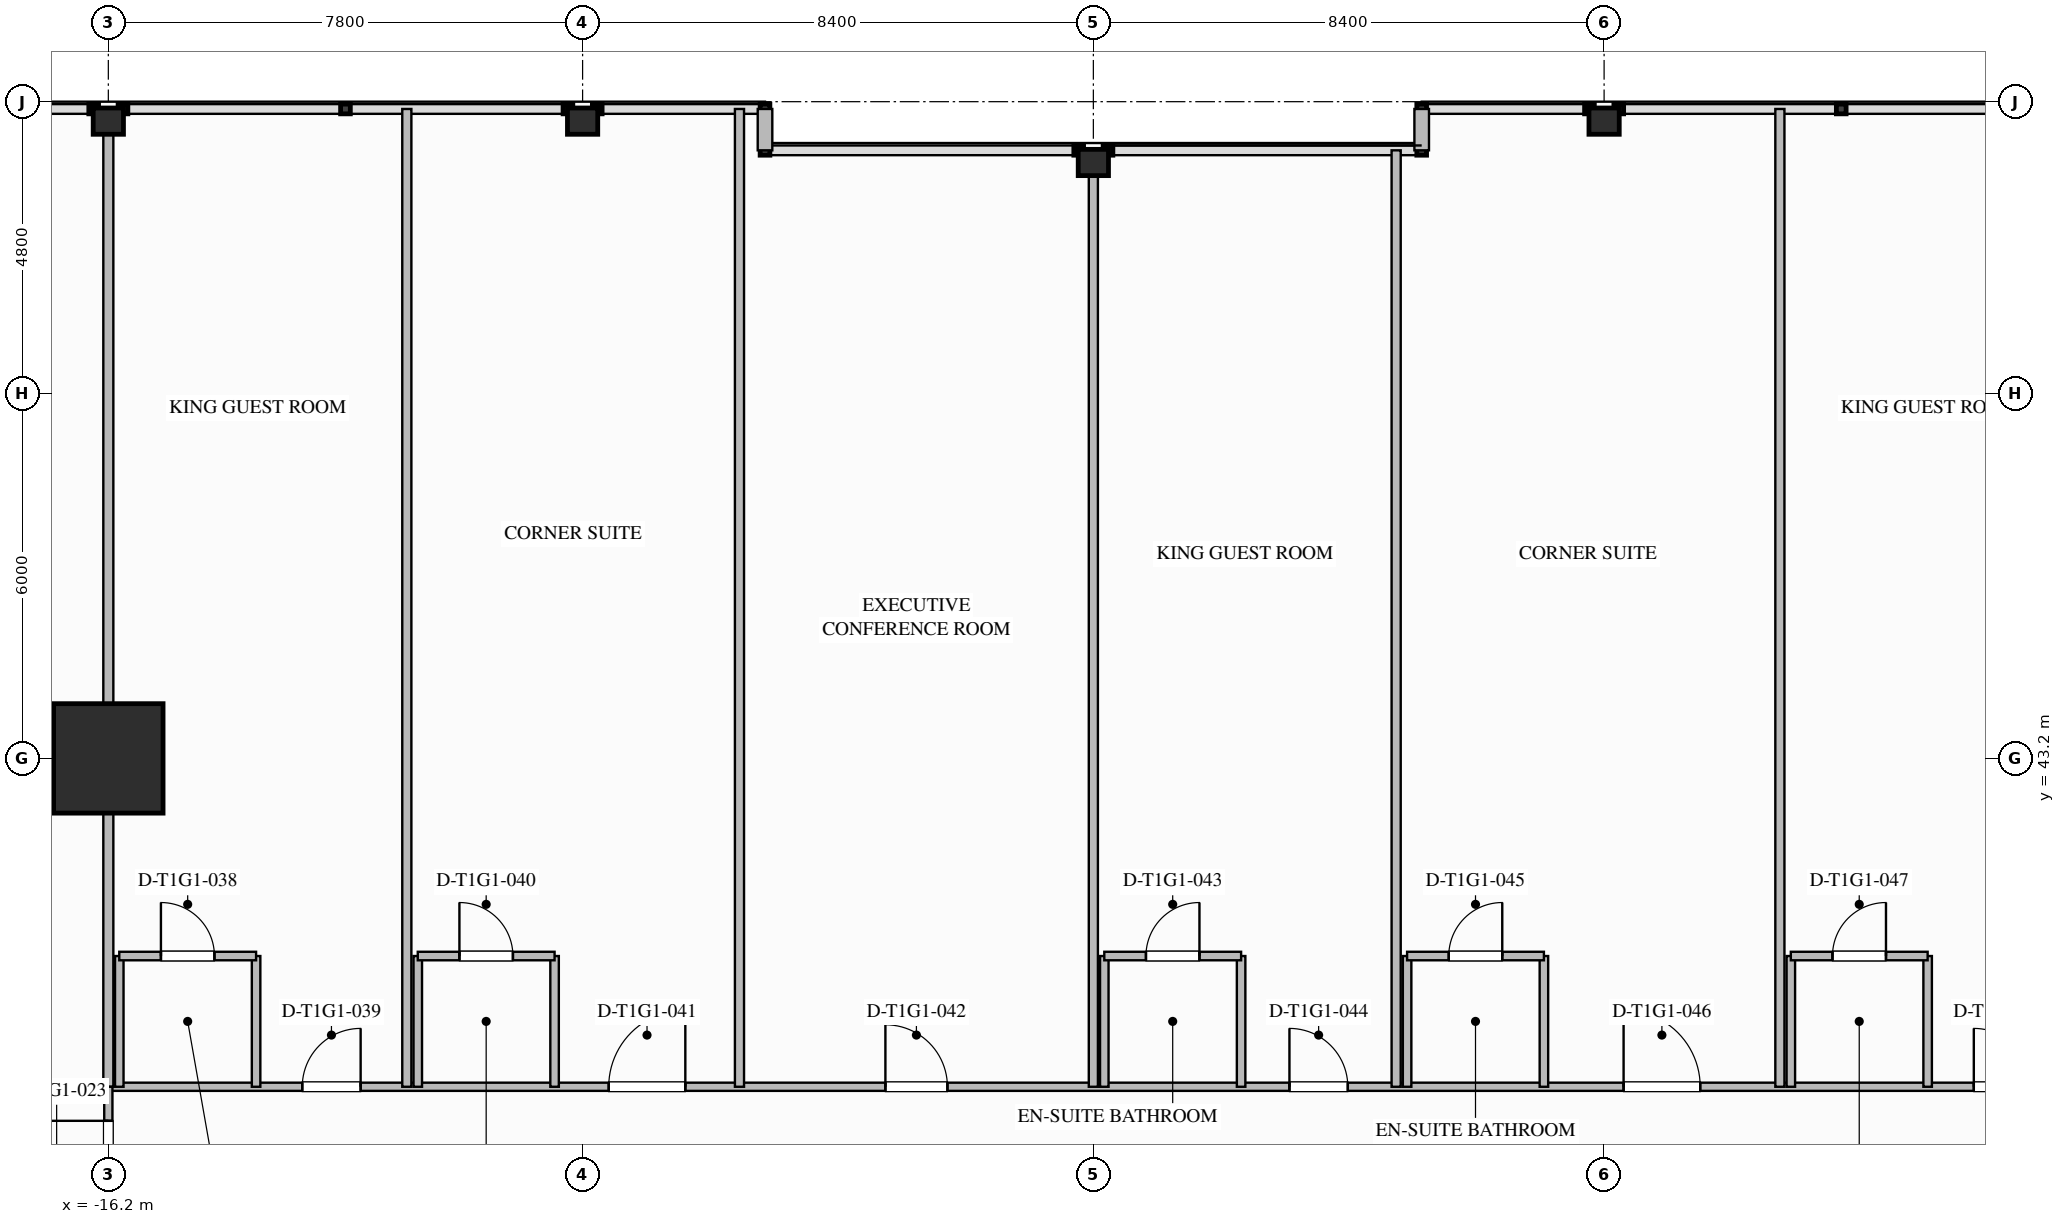
"""IFC4 building model, lengths in metres.
Left out: names, types, materials, properties, quantities, classifications, styles, units other than length and angle.
Written with IfcOpenShell. Run it as: python <this file> out.ifc"""

import sys

from ifc_helpers import new_model, si_unit, direction, frame, frame_2d, origin, origin_2d, place, context, subcontext, project, spatial, rectangle, i_section, extrude, element, fill, save


model = new_model("IFC4")
c1 = context("Model", 3, precision=1e-05, world=origin(), true_north=direction((0.0, 1.0)))
c2 = subcontext(c1, "Body", "Model", "MODEL_VIEW")
j1 = project(units=[si_unit("LENGTHUNIT", "METRE"), si_unit("PLANEANGLEUNIT", "RADIAN")], contexts=[c1])
p1 = place(None, origin())
s1 = spatial("IfcSite", under=j1, at=p1, CompositionType="ELEMENT")
p2 = place(p1, origin())
s2 = spatial("IfcBuilding", under=s1, at=p2, CompositionType="ELEMENT")
p3 = place(p2, frame((0.0, 0.0, 36.7)))
s3 = spatial("IfcBuildingStorey", under=s2, at=p3, CompositionType="ELEMENT", Elevation=36.7)
p4 = place(p3, frame((-16.2, 43.2, 0.0), z_axis=(0.0, 0.0, 1.0), x_axis=(1.0, 0.0, 0.0)))
e1 = element("IfcColumn", 1, at=p4, inside=s3, PredefinedType="COLUMN", context=c2, shape_type="SweptSolid", body=[
    extrude(rectangle(XDim=1.8, YDim=1.8, at=origin_2d()), origin(), (0.0, 0.0, 1.0), 3.5),
])
for number, where, z_axis, x_axis in (
    (2, (-16.2, 53.68, 0.0), (0.0, 0.0, 1.0), (0.0, 1.0, 0.0)),
    (3, (-8.4, 53.68, 0.0), (0.0, 0.0, 1.0), (0.0, 1.0, 0.0)),
    (4, (0.0, 53.0, 0.0), (0.0, 0.0, 1.0), (0.0, 1.0, 0.0)),
    (5, (8.4, 53.68, 0.0), (0.0, 0.0, 1.0), (0.0, 1.0, 0.0)),
):
    element("IfcColumn", number, at=place(p3, frame(where, z_axis=z_axis, x_axis=x_axis)), inside=s3, PredefinedType="COLUMN", context=c2, shape_type="SweptSolid", body=[
        extrude(i_section(OverallWidth=0.432, OverallDepth=0.498, WebThickness=0.056, FlangeThickness=0.089, FilletRadius=0.03, at=origin_2d()), origin(), (0.0, 0.0, 1.0), 3.497),
    ])
for number, where, z_axis, x_axis in (
    (6, (-5.4, 53.88, 0.0), (0.0, 0.0, 1.0), (0.0, -1.0, 0.0)),
    (7, (5.4, 53.2, 0.0), (0.0, 0.0, 1.0), (0.0, 1.0, 0.0)),
):
    element("IfcWall", number, at=place(p3, frame(where, z_axis=z_axis, x_axis=x_axis)), inside=s3, PredefinedType="STANDARD", context=c2, shape_type="SweptSolid", body=[
        extrude(rectangle(XDim=0.68, YDim=0.24, at=frame_2d((0.34, 0.0))), origin(), (0.0, 0.0, 1.0), 3.24),
    ])
p5 = place(p3, frame((-16.2, 37.8, 0.0), z_axis=(0.0, 0.0, 1.0), x_axis=(1.0, 0.0, 0.0)))
e8 = element("IfcWall", 8, at=p5, inside=s3, PredefinedType="PARTITIONING", context=c2, shape_type="SweptSolid", body=[
    extrude(rectangle(XDim=32.4, YDim=0.135, at=frame_2d((16.2, 0.0))), origin(), (0.0, 0.0, 1.0), 3.24),
])
p6 = place(p5, frame((3.189, 0.0, 0.0)))
e9 = element("IfcOpeningElement", 9, at=p6, cuts=e8, PredefinedType="OPENING", context=c2, shape_type="SweptSolid", body=[
    extrude(rectangle(XDim=0.96, YDim=2.15, at=frame_2d((0.48, 1.075))), frame((0.0, 0.077, 0.0), z_axis=(0.0, -1.0, 0.0), x_axis=(1.0, 0.0, 0.0)), (0.0, 0.0, 1.0), 0.155),
])
p7 = place(p5, frame((8.229, 0.0, 0.0)))
e10 = element("IfcOpeningElement", 10, at=p7, cuts=e8, PredefinedType="OPENING", context=c2, shape_type="SweptSolid", body=[
    extrude(rectangle(XDim=1.26, YDim=2.2, at=frame_2d((0.63, 1.1))), frame((0.0, 0.077, 0.0), z_axis=(0.0, -1.0, 0.0), x_axis=(1.0, 0.0, 0.0)), (0.0, 0.0, 1.0), 0.155),
])
p8 = place(p5, frame((12.78, 0.0, 0.0)))
e11 = element("IfcOpeningElement", 11, at=p8, cuts=e8, PredefinedType="OPENING", context=c2, shape_type="SweptSolid", body=[
    extrude(rectangle(XDim=1.02, YDim=2.15, at=frame_2d((0.51, 1.075))), frame((0.0, 0.077, 0.0), z_axis=(0.0, -1.0, 0.0), x_axis=(1.0, 0.0, 0.0)), (0.0, 0.0, 1.0), 0.155),
])
p9 = place(p5, frame((19.425, 0.0, 0.0)))
e12 = element("IfcOpeningElement", 12, at=p9, cuts=e8, PredefinedType="OPENING", context=c2, shape_type="SweptSolid", body=[
    extrude(rectangle(XDim=0.96, YDim=2.15, at=frame_2d((0.48, 1.075))), frame((0.0, 0.077, 0.0), z_axis=(0.0, -1.0, 0.0), x_axis=(1.0, 0.0, 0.0)), (0.0, 0.0, 1.0), 0.155),
])
p10 = place(p5, frame((24.92, 0.0, 0.0)))
e13 = element("IfcOpeningElement", 13, at=p10, cuts=e8, PredefinedType="OPENING", context=c2, shape_type="SweptSolid", body=[
    extrude(rectangle(XDim=1.26, YDim=2.2, at=frame_2d((0.63, 1.1))), frame((0.0, 0.077, 0.0), z_axis=(0.0, -1.0, 0.0), x_axis=(1.0, 0.0, 0.0)), (0.0, 0.0, 1.0), 0.155),
])
p11 = place(p5, frame((30.68, 0.0, 0.0)))
e14 = element("IfcOpeningElement", 14, at=p11, cuts=e8, PredefinedType="OPENING", context=c2, shape_type="SweptSolid", body=[
    extrude(rectangle(XDim=0.96, YDim=2.15, at=frame_2d((0.48, 1.075))), frame((0.0, 0.077, 0.0), z_axis=(0.0, -1.0, 0.0), x_axis=(1.0, 0.0, 0.0)), (0.0, 0.0, 1.0), 0.155),
])
p12 = place(p3, frame((-16.2, 37.8, 0.0), z_axis=(0.0, 0.0, 1.0), x_axis=(0.0, 1.0, 0.0)))
e15 = element("IfcWall", 15, at=p12, inside=s3, PredefinedType="PARTITIONING", context=c2, shape_type="SweptSolid", body=[
    extrude(rectangle(XDim=16.08, YDim=0.165, at=frame_2d((8.04, 0.0))), origin(), (0.0, 0.0, 1.0), 2.298),
])
p13 = place(p3, frame((-16.2, 35.7, 0.0), z_axis=(0.0, 0.0, 1.0), x_axis=(0.0, 1.0, 0.0)))
e16 = element("IfcWall", 16, at=p13, inside=s3, PredefinedType="PARTITIONING", context=c2, shape_type="SweptSolid", body=[
    extrude(rectangle(XDim=2.1, YDim=0.135, at=frame_2d((1.05, 0.0))), origin(), (0.0, 0.0, 1.0), 2.298),
])
p14 = place(p13, frame((0.52, 0.0, 0.0)))
e17 = element("IfcOpeningElement", 17, at=p14, cuts=e16, PredefinedType="OPENING", context=c2, shape_type="SweptSolid", body=[
    extrude(rectangle(XDim=1.02, YDim=2.15, at=frame_2d((0.51, 1.075))), frame((0.0, 0.077, 0.0), z_axis=(0.0, -1.0, 0.0), x_axis=(1.0, 0.0, 0.0)), (0.0, 0.0, 1.0), 0.155),
])
p15 = place(p3, frame((-16.02, 37.8, 0.0), z_axis=(0.0, 0.0, 1.0), x_axis=(0.0, 1.0, 0.0)))
e18 = element("IfcWall", 18, at=p15, inside=s3, PredefinedType="PLUMBINGWALL", context=c2, shape_type="SweptSolid", body=[
    extrude(rectangle(XDim=2.15, YDim=0.14, at=frame_2d((1.075, 0.0))), origin(), (0.0, 0.0, 1.0), 2.298),
])
p16 = place(p3, frame((-13.77, 37.8, 0.0), z_axis=(0.0, 0.0, 1.0), x_axis=(0.0, 1.0, 0.0)))
e19 = element("IfcWall", 19, at=p16, inside=s3, PredefinedType="PLUMBINGWALL", context=c2, shape_type="SweptSolid", body=[
    extrude(rectangle(XDim=2.15, YDim=0.14, at=frame_2d((1.075, 0.0))), origin(), (0.0, 0.0, 1.0), 3.24),
])
p17 = place(p3, frame((-16.02, 39.95, 0.0), z_axis=(0.0, 0.0, 1.0), x_axis=(1.0, 0.0, 0.0)))
e20 = element("IfcWall", 20, at=p17, inside=s3, PredefinedType="PLUMBINGWALL", context=c2, shape_type="SweptSolid", body=[
    extrude(rectangle(XDim=2.25, YDim=0.14, at=frame_2d((1.125, 0.0))), origin(), (0.0, 0.0, 1.0), 3.24),
])
p18 = place(p17, frame((0.685, 0.0, 0.0)))
e21 = element("IfcOpeningElement", 21, at=p18, cuts=e20, PredefinedType="OPENING", context=c2, shape_type="SweptSolid", body=[
    extrude(rectangle(XDim=0.88, YDim=2.1, at=frame_2d((0.44, 1.05))), frame((0.0, 0.08, 0.0), z_axis=(0.0, -1.0, 0.0), x_axis=(1.0, 0.0, 0.0)), (0.0, 0.0, 1.0), 0.16),
])
p19 = place(p3, frame((-11.291, 37.8, 0.0), z_axis=(0.0, 0.0, 1.0), x_axis=(0.0, 1.0, 0.0)))
e22 = element("IfcWall", 22, at=p19, inside=s3, PredefinedType="PARTITIONING", context=c2, shape_type="SweptSolid", body=[
    extrude(rectangle(XDim=16.08, YDim=0.15, at=frame_2d((8.04, 0.0))), origin(), (0.0, 0.0, 1.0), 3.24),
])
for number, where, z_axis, x_axis in (
    (23, (-11.111, 37.8, 0.0), (0.0, 0.0, 1.0), (0.0, 1.0, 0.0)),
    (24, (-8.861, 37.8, 0.0), (0.0, 0.0, 1.0), (0.0, 1.0, 0.0)),
):
    element("IfcWall", number, at=place(p3, frame(where, z_axis=z_axis, x_axis=x_axis)), inside=s3, PredefinedType="PLUMBINGWALL", context=c2, shape_type="SweptSolid", body=[
        extrude(rectangle(XDim=2.15, YDim=0.14, at=frame_2d((1.075, 0.0))), origin(), (0.0, 0.0, 1.0), 3.24),
    ])
p20 = place(p3, frame((-11.111, 39.95, 0.0), z_axis=(0.0, 0.0, 1.0), x_axis=(1.0, 0.0, 0.0)))
e25 = element("IfcWall", 25, at=p20, inside=s3, PredefinedType="PLUMBINGWALL", context=c2, shape_type="SweptSolid", body=[
    extrude(rectangle(XDim=2.25, YDim=0.14, at=frame_2d((1.125, 0.0))), origin(), (0.0, 0.0, 1.0), 3.24),
])
p21 = place(p20, frame((0.685, 0.0, 0.0)))
e26 = element("IfcOpeningElement", 26, at=p21, cuts=e25, PredefinedType="OPENING", context=c2, shape_type="SweptSolid", body=[
    extrude(rectangle(XDim=0.88, YDim=2.1, at=frame_2d((0.44, 1.05))), frame((0.0, 0.08, 0.0), z_axis=(0.0, -1.0, 0.0), x_axis=(1.0, 0.0, 0.0)), (0.0, 0.0, 1.0), 0.16),
])
p22 = place(p3, frame((-5.82, 37.8, 0.0), z_axis=(0.0, 0.0, 1.0), x_axis=(0.0, 1.0, 0.0)))
e27 = element("IfcWall", 27, at=p22, inside=s3, PredefinedType="PARTITIONING", context=c2, shape_type="SweptSolid", body=[
    extrude(rectangle(XDim=16.08, YDim=0.15, at=frame_2d((8.04, 0.0))), origin(), (0.0, 0.0, 1.0), 3.24),
])
p23 = place(p3, frame((0.0, 37.8, 0.0), z_axis=(0.0, 0.0, 1.0), x_axis=(0.0, 1.0, 0.0)))
e28 = element("IfcWall", 28, at=p23, inside=s3, PredefinedType="PARTITIONING", context=c2, shape_type="SweptSolid", body=[
    extrude(rectangle(XDim=15.4, YDim=0.15, at=frame_2d((7.7, 0.0))), origin(), (0.0, 0.0, 1.0), 2.298),
])
p24 = place(p3, frame((0.18, 37.8, 0.0), z_axis=(0.0, 0.0, 1.0), x_axis=(0.0, 1.0, 0.0)))
e29 = element("IfcWall", 29, at=p24, inside=s3, PredefinedType="PLUMBINGWALL", context=c2, shape_type="SweptSolid", body=[
    extrude(rectangle(XDim=2.15, YDim=0.14, at=frame_2d((1.075, 0.0))), origin(), (0.0, 0.0, 1.0), 2.617),
])
p25 = place(p3, frame((2.43, 37.8, 0.0), z_axis=(0.0, 0.0, 1.0), x_axis=(0.0, 1.0, 0.0)))
e30 = element("IfcWall", 30, at=p25, inside=s3, PredefinedType="PLUMBINGWALL", context=c2, shape_type="SweptSolid", body=[
    extrude(rectangle(XDim=2.15, YDim=0.14, at=frame_2d((1.075, 0.0))), origin(), (0.0, 0.0, 1.0), 3.24),
])
p26 = place(p3, frame((0.18, 39.95, 0.0), z_axis=(0.0, 0.0, 1.0), x_axis=(1.0, 0.0, 0.0)))
e31 = element("IfcWall", 31, at=p26, inside=s3, PredefinedType="PLUMBINGWALL", context=c2, shape_type="SweptSolid", body=[
    extrude(rectangle(XDim=2.25, YDim=0.14, at=frame_2d((1.125, 0.0))), origin(), (0.0, 0.0, 1.0), 3.24),
])
p27 = place(p26, frame((0.685, 0.0, 0.0)))
e32 = element("IfcOpeningElement", 32, at=p27, cuts=e31, PredefinedType="OPENING", context=c2, shape_type="SweptSolid", body=[
    extrude(rectangle(XDim=0.88, YDim=2.1, at=frame_2d((0.44, 1.05))), frame((0.0, 0.08, 0.0), z_axis=(0.0, -1.0, 0.0), x_axis=(1.0, 0.0, 0.0)), (0.0, 0.0, 1.0), 0.16),
])
p28 = place(p3, frame((4.98, 37.8, 0.0), z_axis=(0.0, 0.0, 1.0), x_axis=(0.0, 1.0, 0.0)))
e33 = element("IfcWall", 33, at=p28, inside=s3, PredefinedType="PARTITIONING", context=c2, shape_type="SweptSolid", body=[
    extrude(rectangle(XDim=15.4, YDim=0.15, at=frame_2d((7.7, 0.0))), origin(), (0.0, 0.0, 1.0), 3.24),
])
for number, where, z_axis, x_axis in (
    (34, (5.16, 37.8, 0.0), (0.0, 0.0, 1.0), (0.0, 1.0, 0.0)),
    (35, (7.41, 37.8, 0.0), (0.0, 0.0, 1.0), (0.0, 1.0, 0.0)),
):
    element("IfcWall", number, at=place(p3, frame(where, z_axis=z_axis, x_axis=x_axis)), inside=s3, PredefinedType="PLUMBINGWALL", context=c2, shape_type="SweptSolid", body=[
        extrude(rectangle(XDim=2.15, YDim=0.14, at=frame_2d((1.075, 0.0))), origin(), (0.0, 0.0, 1.0), 3.24),
    ])
p29 = place(p3, frame((5.16, 39.95, 0.0), z_axis=(0.0, 0.0, 1.0), x_axis=(1.0, 0.0, 0.0)))
e36 = element("IfcWall", 36, at=p29, inside=s3, PredefinedType="PLUMBINGWALL", context=c2, shape_type="SweptSolid", body=[
    extrude(rectangle(XDim=2.25, YDim=0.14, at=frame_2d((1.125, 0.0))), origin(), (0.0, 0.0, 1.0), 3.24),
])
p30 = place(p29, frame((0.685, 0.0, 0.0)))
e37 = element("IfcOpeningElement", 37, at=p30, cuts=e36, PredefinedType="OPENING", context=c2, shape_type="SweptSolid", body=[
    extrude(rectangle(XDim=0.88, YDim=2.1, at=frame_2d((0.44, 1.05))), frame((0.0, 0.08, 0.0), z_axis=(0.0, -1.0, 0.0), x_axis=(1.0, 0.0, 0.0)), (0.0, 0.0, 1.0), 0.16),
])
p31 = place(p3, frame((11.291, 37.8, 0.0), z_axis=(0.0, 0.0, 1.0), x_axis=(0.0, 1.0, 0.0)))
e38 = element("IfcWall", 38, at=p31, inside=s3, PredefinedType="PARTITIONING", context=c2, shape_type="SweptSolid", body=[
    extrude(rectangle(XDim=16.08, YDim=0.15, at=frame_2d((8.04, 0.0))), origin(), (0.0, 0.0, 1.0), 3.24),
])
for number, where, z_axis, x_axis in (
    (39, (11.471, 37.8, 0.0), (0.0, 0.0, 1.0), (0.0, 1.0, 0.0)),
    (40, (13.721, 37.8, 0.0), (0.0, 0.0, 1.0), (0.0, 1.0, 0.0)),
):
    element("IfcWall", number, at=place(p3, frame(where, z_axis=z_axis, x_axis=x_axis)), inside=s3, PredefinedType="PLUMBINGWALL", context=c2, shape_type="SweptSolid", body=[
        extrude(rectangle(XDim=2.15, YDim=0.14, at=frame_2d((1.075, 0.0))), origin(), (0.0, 0.0, 1.0), 3.24),
    ])
p32 = place(p3, frame((11.471, 39.95, 0.0), z_axis=(0.0, 0.0, 1.0), x_axis=(1.0, 0.0, 0.0)))
e41 = element("IfcWall", 41, at=p32, inside=s3, PredefinedType="PLUMBINGWALL", context=c2, shape_type="SweptSolid", body=[
    extrude(rectangle(XDim=2.25, YDim=0.14, at=frame_2d((1.125, 0.0))), origin(), (0.0, 0.0, 1.0), 3.24),
])
p33 = place(p32, frame((0.685, 0.0, 0.0)))
e42 = element("IfcOpeningElement", 42, at=p33, cuts=e41, PredefinedType="OPENING", context=c2, shape_type="SweptSolid", body=[
    extrude(rectangle(XDim=0.88, YDim=2.1, at=frame_2d((0.44, 1.05))), frame((0.0, 0.08, 0.0), z_axis=(0.0, -1.0, 0.0), x_axis=(1.0, 0.0, 0.0)), (0.0, 0.0, 1.0), 0.16),
])
p34 = place(p14, origin())
e43 = element("IfcDoor", 43, at=p34, inside=s3, OperationType="SINGLE_SWING_RIGHT", PredefinedType="DOOR", context=c2, shape_type="SweptSolid", body=[
    extrude(rectangle(XDim=1.02, YDim=2.15, at=frame_2d((0.51, 1.075))), frame((0.0, 0.025, 0.0), z_axis=(0.0, -1.0, 0.0), x_axis=(1.0, 0.0, 0.0)), (0.0, 0.0, 1.0), 0.05),
])
fill(e17, e43)
p35 = place(p18, origin())
e44 = element("IfcDoor", 44, at=p35, inside=s3, OperationType="SINGLE_SWING_LEFT", PredefinedType="DOOR", context=c2, shape_type="SweptSolid", body=[
    extrude(rectangle(XDim=0.88, YDim=2.1, at=frame_2d((0.44, 1.05))), frame((0.0, 0.025, 0.0), z_axis=(0.0, -1.0, 0.0), x_axis=(1.0, 0.0, 0.0)), (0.0, 0.0, 1.0), 0.05),
])
fill(e21, e44)
p36 = place(p6, origin())
e45 = element("IfcDoor", 45, at=p36, inside=s3, OperationType="SINGLE_SWING_RIGHT", PredefinedType="DOOR", context=c2, shape_type="SweptSolid", body=[
    extrude(rectangle(XDim=0.96, YDim=2.15, at=frame_2d((0.48, 1.075))), frame((0.0, 0.025, 0.0), z_axis=(0.0, -1.0, 0.0), x_axis=(1.0, 0.0, 0.0)), (0.0, 0.0, 1.0), 0.05),
])
fill(e9, e45)
p37 = place(p21, origin())
e46 = element("IfcDoor", 46, at=p37, inside=s3, OperationType="SINGLE_SWING_LEFT", PredefinedType="DOOR", context=c2, shape_type="SweptSolid", body=[
    extrude(rectangle(XDim=0.88, YDim=2.1, at=frame_2d((0.44, 1.05))), frame((0.0, 0.025, 0.0), z_axis=(0.0, -1.0, 0.0), x_axis=(1.0, 0.0, 0.0)), (0.0, 0.0, 1.0), 0.05),
])
fill(e26, e46)
p38 = place(p7, origin())
e47 = element("IfcDoor", 47, at=p38, inside=s3, OperationType="SINGLE_SWING_RIGHT", PredefinedType="DOOR", context=c2, shape_type="SweptSolid", body=[
    extrude(rectangle(XDim=1.26, YDim=2.2, at=frame_2d((0.63, 1.1))), frame((0.0, 0.025, 0.0), z_axis=(0.0, -1.0, 0.0), x_axis=(1.0, 0.0, 0.0)), (0.0, 0.0, 1.0), 0.05),
])
fill(e10, e47)
p39 = place(p8, origin())
e48 = element("IfcDoor", 48, at=p39, inside=s3, OperationType="SINGLE_SWING_LEFT", PredefinedType="DOOR", context=c2, shape_type="SweptSolid", body=[
    extrude(rectangle(XDim=1.02, YDim=2.15, at=frame_2d((0.51, 1.075))), frame((0.0, 0.025, 0.0), z_axis=(0.0, -1.0, 0.0), x_axis=(1.0, 0.0, 0.0)), (0.0, 0.0, 1.0), 0.05),
])
fill(e11, e48)
p40 = place(p27, origin())
e49 = element("IfcDoor", 49, at=p40, inside=s3, OperationType="SINGLE_SWING_RIGHT", PredefinedType="DOOR", context=c2, shape_type="SweptSolid", body=[
    extrude(rectangle(XDim=0.88, YDim=2.1, at=frame_2d((0.44, 1.05))), frame((0.0, 0.025, 0.0), z_axis=(0.0, -1.0, 0.0), x_axis=(1.0, 0.0, 0.0)), (0.0, 0.0, 1.0), 0.05),
])
fill(e32, e49)
p41 = place(p9, origin())
e50 = element("IfcDoor", 50, at=p41, inside=s3, OperationType="SINGLE_SWING_LEFT", PredefinedType="DOOR", context=c2, shape_type="SweptSolid", body=[
    extrude(rectangle(XDim=0.96, YDim=2.15, at=frame_2d((0.48, 1.075))), frame((0.0, 0.025, 0.0), z_axis=(0.0, -1.0, 0.0), x_axis=(1.0, 0.0, 0.0)), (0.0, 0.0, 1.0), 0.05),
])
fill(e12, e50)
p42 = place(p30, origin())
e51 = element("IfcDoor", 51, at=p42, inside=s3, OperationType="SINGLE_SWING_RIGHT", PredefinedType="DOOR", context=c2, shape_type="SweptSolid", body=[
    extrude(rectangle(XDim=0.88, YDim=2.1, at=frame_2d((0.44, 1.05))), frame((0.0, 0.025, 0.0), z_axis=(0.0, -1.0, 0.0), x_axis=(1.0, 0.0, 0.0)), (0.0, 0.0, 1.0), 0.05),
])
fill(e37, e51)
p43 = place(p10, origin())
e52 = element("IfcDoor", 52, at=p43, inside=s3, OperationType="SINGLE_SWING_LEFT", PredefinedType="DOOR", context=c2, shape_type="SweptSolid", body=[
    extrude(rectangle(XDim=1.26, YDim=2.2, at=frame_2d((0.63, 1.1))), frame((0.0, 0.025, 0.0), z_axis=(0.0, -1.0, 0.0), x_axis=(1.0, 0.0, 0.0)), (0.0, 0.0, 1.0), 0.05),
])
fill(e13, e52)
p44 = place(p33, origin())
e53 = element("IfcDoor", 53, at=p44, inside=s3, OperationType="SINGLE_SWING_RIGHT", PredefinedType="DOOR", context=c2, shape_type="SweptSolid", body=[
    extrude(rectangle(XDim=0.88, YDim=2.1, at=frame_2d((0.44, 1.05))), frame((0.0, 0.025, 0.0), z_axis=(0.0, -1.0, 0.0), x_axis=(1.0, 0.0, 0.0)), (0.0, 0.0, 1.0), 0.05),
])
fill(e42, e53)
p45 = place(p11, origin())
e54 = element("IfcDoor", 54, at=p45, inside=s3, OperationType="SINGLE_SWING_LEFT", PredefinedType="DOOR", context=c2, shape_type="SweptSolid", body=[
    extrude(rectangle(XDim=0.96, YDim=2.15, at=frame_2d((0.48, 1.075))), frame((0.0, 0.025, 0.0), z_axis=(0.0, -1.0, 0.0), x_axis=(1.0, 0.0, 0.0)), (0.0, 0.0, 1.0), 0.05),
])
fill(e14, e54)
save(model, sys.argv[1])
